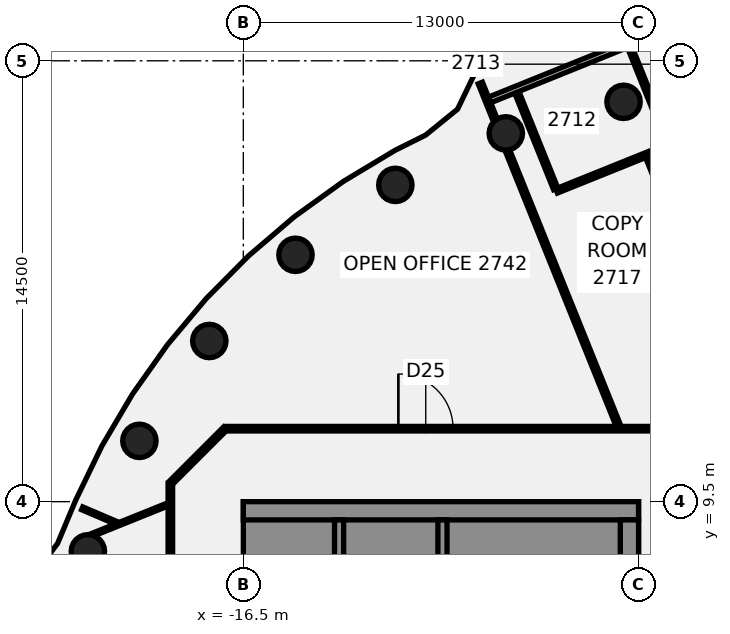
"""IFC4 building model, lengths in metres.
Left out: names, types, materials, properties, quantities, classifications, styles, units other than length and angle.
Written with IfcOpenShell. Run it as: python <this file> out.ifc"""

import sys

from ifc_helpers import new_model, si_unit, direction, frame, frame_2d, origin, origin_2d, place, context, subcontext, project, spatial, polyline, rectangle, circle, outline, extrude, element, fill, save


model = new_model("IFC4")
c1 = context("Model", 3, precision=1e-05, world=origin(), true_north=direction((0.0, 1.0)))
c2 = subcontext(c1, "Body", "Model", "MODEL_VIEW")
j1 = project(units=[si_unit("LENGTHUNIT", "METRE"), si_unit("PLANEANGLEUNIT", "RADIAN")], contexts=[c1])
p1 = place(None, origin())
s1 = spatial("IfcSite", under=j1, at=p1, CompositionType="ELEMENT")
p2 = place(p1, origin())
s2 = spatial("IfcBuilding", under=s1, at=p2, CompositionType="ELEMENT")
p3 = place(p2, frame((0.0, 0.0, 113.5)))
s3 = spatial("IfcBuildingStorey", under=s2, at=p3, CompositionType="ELEMENT", Elevation=113.5)
for number, where, z_axis, x_axis in (
    (1, (-3.994, 22.651, -0.14), (0.0, 0.0, 1.0), (1.0, 0.0, 0.0)),
    (2, (-7.866, 21.613, -0.14), (0.0, 0.0, 1.0), (1.0, 0.0, 0.0)),
    (3, (-11.5, 19.919, -0.14), (0.0, 0.0, 1.0), (1.0, 0.0, 0.0)),
    (4, (-14.784, 17.619, -0.14), (0.0, 0.0, 1.0), (1.0, 0.0, 0.0)),
    (5, (-17.619, 14.784, -0.14), (0.0, 0.0, 1.0), (1.0, 0.0, 0.0)),
    (6, (-19.919, 11.5, -0.14), (0.0, 0.0, 1.0), (1.0, 0.0, 0.0)),
    (7, (-21.613, 7.866, -0.14), (0.0, 0.0, 1.0), (1.0, 0.0, 0.0)),
):
    element("IfcColumn", number, at=place(p3, frame(where, z_axis=z_axis, x_axis=x_axis)), inside=s3, PredefinedType="COLUMN", context=c2, shape_type="SweptSolid", body=[
        extrude(circle(Radius=0.55, at=origin_2d()), origin(), (0.0, 0.0, 1.0), 3.75),
    ])
p4 = place(p3, frame((-8.705, 23.27, 0.0), z_axis=(0.0, 0.0, 1.0), x_axis=(0.37370081595, -0.927549297967, 0.0)))
e8 = element("IfcWall", 8, at=p4, inside=s3, PredefinedType="PARTITIONING", context=c2, shape_type="SweptSolid", body=[
    extrude(rectangle(XDim=1.33, YDim=0.15, at=frame_2d((0.665, 0.0))), origin(), (0.0, 0.0, 1.0), 3.01),
])
p5 = place(p3, frame((-7.817, 21.066, 0.0), z_axis=(0.0, 0.0, 1.0), x_axis=(0.373620675782, -0.927581581656, 0.0)))
e9 = element("IfcWall", 9, at=p5, inside=s3, PredefinedType="PARTITIONING", context=c2, shape_type="SweptSolid", body=[
    extrude(rectangle(XDim=9.792, YDim=0.15, at=frame_2d((4.896, 0.0))), origin(), (0.0, 0.0, 1.0), 3.01),
])
p6 = place(p3, frame((-7.505, 22.966, 0.0), z_axis=(0.0, 0.0, 1.0), x_axis=(0.373515454624, -0.927623956761, 0.0)))
e10 = element("IfcWall", 10, at=p6, inside=s3, PredefinedType="PARTITIONING", context=c2, shape_type="SweptSolid", body=[
    extrude(rectangle(XDim=3.426, YDim=0.15, at=frame_2d((1.713, 0.0))), origin(), (0.0, 0.0, 1.0), 3.01),
])
p7 = place(p3, frame((-5.868, 33.355, 0.0), z_axis=(0.0, 0.0, 1.0), x_axis=(0.373686710096, -0.927554980957, 0.0)))
e11 = element("IfcWall", 11, at=p7, inside=s3, PredefinedType="PARTITIONING", context=c2, shape_type="SweptSolid", body=[
    extrude(rectangle(XDim=11.306, YDim=0.15, at=frame_2d((5.653, 0.0))), origin(), (0.0, 0.0, 1.0), 3.01),
])
p8 = place(p7, frame((9.676, 0.0, 0.0)))
e12 = element("IfcOpeningElement", 12, at=p8, cuts=e11, PredefinedType="OPENING", context=c2, shape_type="SweptSolid", body=[
    extrude(rectangle(XDim=1.0, YDim=2.1, at=frame_2d((0.5, 1.05))), frame((0.0, 0.085, 0.0), z_axis=(0.0, -1.0, 0.0), x_axis=(1.0, 0.0, 0.0)), (0.0, 0.0, 1.0), 0.17),
])
p9 = place(p7, frame((0.975, 0.0, 0.0)))
e13 = element("IfcOpeningElement", 13, at=p9, cuts=e11, PredefinedType="OPENING", context=c2, shape_type="SweptSolid", body=[
    extrude(rectangle(XDim=1.8, YDim=2.1, at=frame_2d((0.9, 1.05))), frame((0.0, 0.085, 0.0), z_axis=(0.0, -1.0, 0.0), x_axis=(1.0, 0.0, 0.0)), (0.0, 0.0, 1.0), 0.17),
])
p10 = place(p7, frame((6.226, 0.0, 0.0)))
e14 = element("IfcOpeningElement", 14, at=p10, cuts=e11, PredefinedType="OPENING", context=c2, shape_type="SweptSolid", body=[
    extrude(rectangle(XDim=1.8, YDim=2.1, at=frame_2d((0.9, 1.05))), frame((0.0, 0.085, 0.0), z_axis=(0.0, -1.0, 0.0), x_axis=(1.0, 0.0, 0.0)), (0.0, 0.0, 1.0), 0.17),
])
p11 = place(p3, frame((-3.795, 24.46, 0.0), z_axis=(0.0, 0.0, 1.0), x_axis=(0.373945590209, -0.927450643195, 0.0)))
e15 = element("IfcWall", 15, at=p11, inside=s3, PredefinedType="PARTITIONING", context=c2, shape_type="SweptSolid", body=[
    extrude(rectangle(XDim=3.425, YDim=0.15, at=frame_2d((1.712, 0.0))), origin(), (0.0, 0.0, 1.0), 3.01),
])
p12 = place(p11, frame((2.45, 0.0, 0.0)))
e16 = element("IfcOpeningElement", 16, at=p12, cuts=e15, PredefinedType="OPENING", context=c2, shape_type="SweptSolid", body=[
    extrude(rectangle(XDim=0.9, YDim=2.1, at=frame_2d((0.45, 1.05))), frame((0.0, 0.085, 0.0), z_axis=(0.0, -1.0, 0.0), x_axis=(1.0, 0.0, 0.0)), (0.0, 0.0, 1.0), 0.17),
])
p13 = place(p3, frame((-3.2, 20.845, 0.0), z_axis=(0.0, 0.0, 1.0), x_axis=(0.373601376601, -0.927589354942, 0.0)))
e17 = element("IfcWall", 17, at=p13, inside=s3, PredefinedType="PARTITIONING", context=c2, shape_type="SweptSolid", body=[
    extrude(rectangle(XDim=9.554, YDim=0.15, at=frame_2d((4.777, 0.0))), origin(), (0.0, 0.0, 1.0), 3.01),
])
p14 = place(p13, frame((5.625, 0.0, 0.0)))
e18 = element("IfcOpeningElement", 18, at=p14, cuts=e17, PredefinedType="OPENING", context=c2, shape_type="SweptSolid", body=[
    extrude(rectangle(XDim=0.9, YDim=2.1, at=frame_2d((0.45, 1.05))), frame((0.0, 0.085, 0.0), z_axis=(0.0, -1.0, 0.0), x_axis=(1.0, 0.0, 0.0)), (0.0, 0.0, 1.0), 0.17),
])
p15 = place(p3, frame((-21.8, 9.281, 0.0), z_axis=(0.0, 0.0, 1.0), x_axis=(0.919919713951, -0.392106771025, 0.0)))
e19 = element("IfcWall", 19, at=p15, inside=s3, PredefinedType="PARTITIONING", context=c2, shape_type="SweptSolid", body=[
    extrude(rectangle(XDim=1.22, YDim=0.1, at=frame_2d((0.61, 0.0))), origin(), (0.0, 0.0, 1.0), 3.01),
])
p16 = place(p3, frame((-17.065, 11.9, 0.0), z_axis=(0.0, 0.0, 1.0), x_axis=(1.0, 0.0, 0.0)))
e20 = element("IfcWall", 20, at=p16, inside=s3, PredefinedType="PARTITIONING", context=c2, shape_type="SweptSolid", body=[
    extrude(rectangle(XDim=34.165, YDim=0.15, at=frame_2d((17.083, 0.0))), origin(), (0.0, 0.0, 1.0), 3.01),
])
p17 = place(p16, frame((20.168, 0.0, 0.0)))
e21 = element("IfcOpeningElement", 21, at=p17, cuts=e20, PredefinedType="OPENING", context=c2, shape_type="SweptSolid", body=[
    extrude(rectangle(XDim=1.8, YDim=2.1, at=frame_2d((0.9, 1.05))), frame((0.0, 0.085, 0.0), z_axis=(0.0, -1.0, 0.0), x_axis=(1.0, 0.0, 0.0)), (0.0, 0.0, 1.0), 0.17),
])
p18 = place(p16, frame((31.277, 0.0, 0.0)))
e22 = element("IfcOpeningElement", 22, at=p18, cuts=e20, PredefinedType="OPENING", context=c2, shape_type="SweptSolid", body=[
    extrude(rectangle(XDim=1.8, YDim=2.1, at=frame_2d((0.9, 1.05))), frame((0.0, 0.085, 0.0), z_axis=(0.0, -1.0, 0.0), x_axis=(1.0, 0.0, 0.0)), (0.0, 0.0, 1.0), 0.17),
])
p19 = place(p16, frame((5.665, 0.0, 0.0)))
e23 = element("IfcOpeningElement", 23, at=p19, cuts=e20, PredefinedType="OPENING", context=c2, shape_type="SweptSolid", body=[
    extrude(rectangle(XDim=1.8, YDim=2.1, at=frame_2d((0.9, 1.05))), frame((0.0, 0.085, 0.0), z_axis=(0.0, -1.0, 0.0), x_axis=(1.0, 0.0, 0.0)), (0.0, 0.0, 1.0), 0.17),
])
p20 = place(p3, frame((-21.498, 8.396, 0.0), z_axis=(0.0, 0.0, 1.0), x_axis=(0.927570424406, 0.373648374502, 0.0)))
e24 = element("IfcWall", 24, at=p20, inside=s3, PredefinedType="PARTITIONING", context=c2, shape_type="SweptSolid", body=[
    extrude(rectangle(XDim=2.721, YDim=0.1, at=frame_2d((1.36, 0.0))), origin(), (0.0, 0.0, 1.0), 3.01),
])
p21 = place(p3, frame((-8.399, 22.713, 0.0), z_axis=(0.0, 0.0, 1.0), x_axis=(0.927366941988, 0.374153116929, 0.0)))
e25 = element("IfcWall", 25, at=p21, inside=s3, PredefinedType="PARTITIONING", context=c2, shape_type="SweptSolid", body=[
    extrude(rectangle(XDim=14.224, YDim=0.2, at=frame_2d((7.112, 0.0))), origin(), (0.0, 0.0, 1.0), 3.01),
])
p22 = place(p21, frame((6.925, 0.0, 0.0)))
e26 = element("IfcOpeningElement", 26, at=p22, cuts=e25, PredefinedType="OPENING", context=c2, shape_type="SweptSolid", body=[
    extrude(rectangle(XDim=1.4, YDim=2.1, at=frame_2d((0.7, 1.05))), frame((0.0, 0.11, 0.0), z_axis=(0.0, -1.0, 0.0), x_axis=(1.0, 0.0, 0.0)), (0.0, 0.0, 1.0), 0.22),
])
p23 = place(p3, frame((-6.197, 19.719, 0.0), z_axis=(0.0, 0.0, 1.0), x_axis=(0.927569092415, 0.373651681109, 0.0)))
e27 = element("IfcWall", 27, at=p23, inside=s3, PredefinedType="PARTITIONING", context=c2, shape_type="SweptSolid", body=[
    extrude(rectangle(XDim=4.001, YDim=0.15, at=frame_2d((2.0, 0.0))), origin(), (0.0, 0.0, 1.0), 3.01),
])
p24 = place(p3, frame((-18.872, 10.128, 0.0), z_axis=(0.0, 0.0, 1.0), x_axis=(0.707106781187, 0.707106781187, 0.0)))
e28 = element("IfcWall", 28, at=p24, inside=s3, PredefinedType="PARTITIONING", context=c2, shape_type="SweptSolid", body=[
    extrude(rectangle(XDim=2.505, YDim=0.15, at=frame_2d((1.253, 0.0))), origin(), (0.0, 0.0, 1.0), 3.01),
])
p25 = place(p3, frame((-18.9, -10.1, 0.0), z_axis=(0.0, 0.0, 1.0), x_axis=(0.0, 1.0, 0.0)))
e29 = element("IfcWall", 29, at=p25, inside=s3, PredefinedType="PARTITIONING", context=c2, shape_type="SweptSolid", body=[
    extrude(rectangle(XDim=20.2, YDim=0.15, at=frame_2d((10.1, 0.0))), origin(), (0.0, 0.0, 1.0), 3.01),
])
p26 = place(p25, frame((9.633, 0.0, 0.0)))
e30 = element("IfcOpeningElement", 30, at=p26, cuts=e29, PredefinedType="OPENING", context=c2, shape_type="SweptSolid", body=[
    extrude(rectangle(XDim=1.8, YDim=2.1, at=frame_2d((0.9, 1.05))), frame((0.0, 0.085, 0.0), z_axis=(0.0, -1.0, 0.0), x_axis=(1.0, 0.0, 0.0)), (0.0, 0.0, 1.0), 0.17),
])
p27 = place(p25, frame((5.555, 0.0, 0.0)))
e31 = element("IfcOpeningElement", 31, at=p27, cuts=e29, PredefinedType="OPENING", context=c2, shape_type="SweptSolid", body=[
    extrude(rectangle(XDim=0.9, YDim=2.1, at=frame_2d((0.45, 1.05))), frame((0.0, 0.085, 0.0), z_axis=(0.0, -1.0, 0.0), x_axis=(1.0, 0.0, 0.0)), (0.0, 0.0, 1.0), 0.17),
])
p28 = place(p3, origin())
e32 = element("IfcWall", 32, at=p28, inside=s3, PredefinedType="SHEAR", context=c2, shape_type="SweptSolid", body=[
    extrude(outline(polyline([(-13.5, -8.9), (-13.5, -8.125), (-15.9, -8.125), (-15.9, -5.625), (-13.5, -5.625), (-13.5, -5.375), (-15.9, -5.375), (-15.9, -2.875), (-13.5, -2.875), (-13.5, -2.625), (-15.9, -2.625), (-15.9, -0.125), (-13.5, -0.125), (-13.5, 0.125), (-15.9, 0.125), (-15.9, 2.625), (-13.5, 2.625), (-13.5, 2.875), (-15.9, 2.875), (-15.9, 5.375), (-13.5, 5.375), (-13.5, 5.625), (-15.9, 5.625), (-15.9, 8.125), (-13.5, 8.125), (-13.5, 8.9), (-15.9, 8.9), (-16.5, 8.9), (-16.5, -8.9), (-15.9, -8.9), (-13.5, -8.9)])), origin(), (0.0, 0.0, 1.0), 3.61),
])
p29 = place(p3, frame((-16.5, 9.2, 0.0), z_axis=(0.0, 0.0, 1.0), x_axis=(1.0, 0.0, 0.0)))
e33 = element("IfcWall", 33, at=p29, inside=s3, PredefinedType="SHEAR", context=c2, shape_type="SweptSolid", body=[
    extrude(rectangle(XDim=13.0, YDim=0.6, at=frame_2d((6.5, 0.0))), origin(), (0.0, 0.0, 1.0), 3.61),
])
p30 = place(p3, origin())
e34 = element("IfcWall", 34, at=p30, inside=s3, PredefinedType="SHEAR", context=c2, shape_type="SweptSolid", body=[
    extrude(outline(polyline([(-9.8, -5.375), (-9.8, -5.625), (-7.5, -5.625), (-7.2, -5.625), (-7.2, 8.9), (-7.5, 8.9), (-9.8, 8.9), (-9.8, 8.125), (-7.5, 8.125), (-7.5, 5.625), (-9.8, 5.625), (-9.8, 5.375), (-7.5, 5.375), (-7.5, 2.875), (-9.8, 2.875), (-9.8, 2.625), (-7.5, 2.625), (-7.5, 0.125), (-9.8, 0.125), (-9.8, -0.125), (-7.5, -0.125), (-7.5, -2.625), (-9.8, -2.625), (-9.8, -2.875), (-7.5, -2.875), (-7.5, -5.375), (-9.8, -5.375)])), origin(), (0.0, 0.0, 1.0), 3.61),
])
p31 = place(p3, frame((-13.35, -8.9, 0.0), z_axis=(0.0, 0.0, 1.0), x_axis=(0.0, 1.0, 0.0)))
e35 = element("IfcWall", 35, at=p31, inside=s3, PredefinedType="SHEAR", context=c2, shape_type="SweptSolid", body=[
    extrude(rectangle(XDim=17.8, YDim=0.3, at=frame_2d((8.9, 0.0))), origin(), (0.0, 0.0, 1.0), 3.61),
])
p32 = place(p31, frame((1.325, 0.0, 0.0)))
e36 = element("IfcOpeningElement", 36, at=p32, cuts=e35, PredefinedType="OPENING", context=c2, shape_type="SweptSolid", body=[
    extrude(rectangle(XDim=1.4, YDim=2.1, at=frame_2d((0.7, 1.05))), frame((0.0, 0.16, 0.0), z_axis=(0.0, -1.0, 0.0), x_axis=(1.0, 0.0, 0.0)), (0.0, 0.0, 1.0), 0.32),
])
p33 = place(p31, frame((4.225, 0.0, 0.0)))
e37 = element("IfcOpeningElement", 37, at=p33, cuts=e35, PredefinedType="OPENING", context=c2, shape_type="SweptSolid", body=[
    extrude(rectangle(XDim=1.1, YDim=2.1, at=frame_2d((0.55, 1.05))), frame((0.0, 0.16, 0.0), z_axis=(0.0, -1.0, 0.0), x_axis=(1.0, 0.0, 0.0)), (0.0, 0.0, 1.0), 0.32),
])
p34 = place(p31, frame((6.975, 0.0, 0.0)))
e38 = element("IfcOpeningElement", 38, at=p34, cuts=e35, PredefinedType="OPENING", context=c2, shape_type="SweptSolid", body=[
    extrude(rectangle(XDim=1.1, YDim=2.1, at=frame_2d((0.55, 1.05))), frame((0.0, 0.16, 0.0), z_axis=(0.0, -1.0, 0.0), x_axis=(1.0, 0.0, 0.0)), (0.0, 0.0, 1.0), 0.32),
])
p35 = place(p31, frame((9.725, 0.0, 0.0)))
e39 = element("IfcOpeningElement", 39, at=p35, cuts=e35, PredefinedType="OPENING", context=c2, shape_type="SweptSolid", body=[
    extrude(rectangle(XDim=1.1, YDim=2.1, at=frame_2d((0.55, 1.05))), frame((0.0, 0.16, 0.0), z_axis=(0.0, -1.0, 0.0), x_axis=(1.0, 0.0, 0.0)), (0.0, 0.0, 1.0), 0.32),
])
p36 = place(p31, frame((12.475, 0.0, 0.0)))
e40 = element("IfcOpeningElement", 40, at=p36, cuts=e35, PredefinedType="OPENING", context=c2, shape_type="SweptSolid", body=[
    extrude(rectangle(XDim=1.1, YDim=2.1, at=frame_2d((0.55, 1.05))), frame((0.0, 0.16, 0.0), z_axis=(0.0, -1.0, 0.0), x_axis=(1.0, 0.0, 0.0)), (0.0, 0.0, 1.0), 0.32),
])
p37 = place(p3, frame((-9.95, -8.9, 0.0), z_axis=(0.0, 0.0, 1.0), x_axis=(0.0, 1.0, 0.0)))
e41 = element("IfcWall", 41, at=p37, inside=s3, PredefinedType="SHEAR", context=c2, shape_type="SweptSolid", body=[
    extrude(rectangle(XDim=17.8, YDim=0.3, at=frame_2d((8.9, 0.0))), origin(), (0.0, 0.0, 1.0), 3.61),
])
p38 = place(p3, frame((-3.8, -8.9, 0.0), z_axis=(0.0, 0.0, 1.0), x_axis=(0.0, 1.0, 0.0)))
e42 = element("IfcWall", 42, at=p38, inside=s3, PredefinedType="SHEAR", context=c2, shape_type="SweptSolid", body=[
    extrude(rectangle(XDim=17.8, YDim=0.6, at=frame_2d((8.9, 0.0))), origin(), (0.0, 0.0, 1.0), 3.61),
])
p39 = place(p38, frame((1.25, 0.0, 0.0)))
e43 = element("IfcOpeningElement", 43, at=p39, cuts=e42, PredefinedType="OPENING", context=c2, shape_type="SweptSolid", body=[
    extrude(rectangle(XDim=1.8, YDim=2.1, at=frame_2d((0.9, 1.05))), frame((0.0, 0.31, 0.0), z_axis=(0.0, -1.0, 0.0), x_axis=(1.0, 0.0, 0.0)), (0.0, 0.0, 1.0), 0.62),
])
p40 = place(p38, frame((11.698, 0.0, 0.0)))
e44 = element("IfcOpeningElement", 44, at=p40, cuts=e42, PredefinedType="OPENING", context=c2, shape_type="SweptSolid", body=[
    extrude(rectangle(XDim=1.0, YDim=2.1, at=frame_2d((0.5, 1.05))), frame((0.0, 0.31, 0.0), z_axis=(0.0, -1.0, 0.0), x_axis=(1.0, 0.0, 0.0)), (0.0, 0.0, 1.0), 0.62),
])
p41 = place(p38, frame((15.222, 0.0, 0.0)))
e45 = element("IfcOpeningElement", 45, at=p41, cuts=e42, PredefinedType="OPENING", context=c2, shape_type="SweptSolid", body=[
    extrude(rectangle(XDim=1.0, YDim=2.1, at=frame_2d((0.5, 1.05))), frame((0.0, 0.31, 0.0), z_axis=(0.0, -1.0, 0.0), x_axis=(1.0, 0.0, 0.0)), (0.0, 0.0, 1.0), 0.62),
])
p42 = place(p19, origin())
e46 = element("IfcDoor", 46, at=p42, inside=s3, OperationType="DOUBLE_DOOR_SINGLE_SWING", PredefinedType="DOOR", context=c2, shape_type="SweptSolid", body=[
    extrude(rectangle(XDim=1.8, YDim=2.1, at=frame_2d((0.9, 1.05))), frame((0.0, 0.025, 0.0), z_axis=(0.0, -1.0, 0.0), x_axis=(1.0, 0.0, 0.0)), (0.0, 0.0, 1.0), 0.05),
])
fill(e23, e46)
save(model, sys.argv[1])
